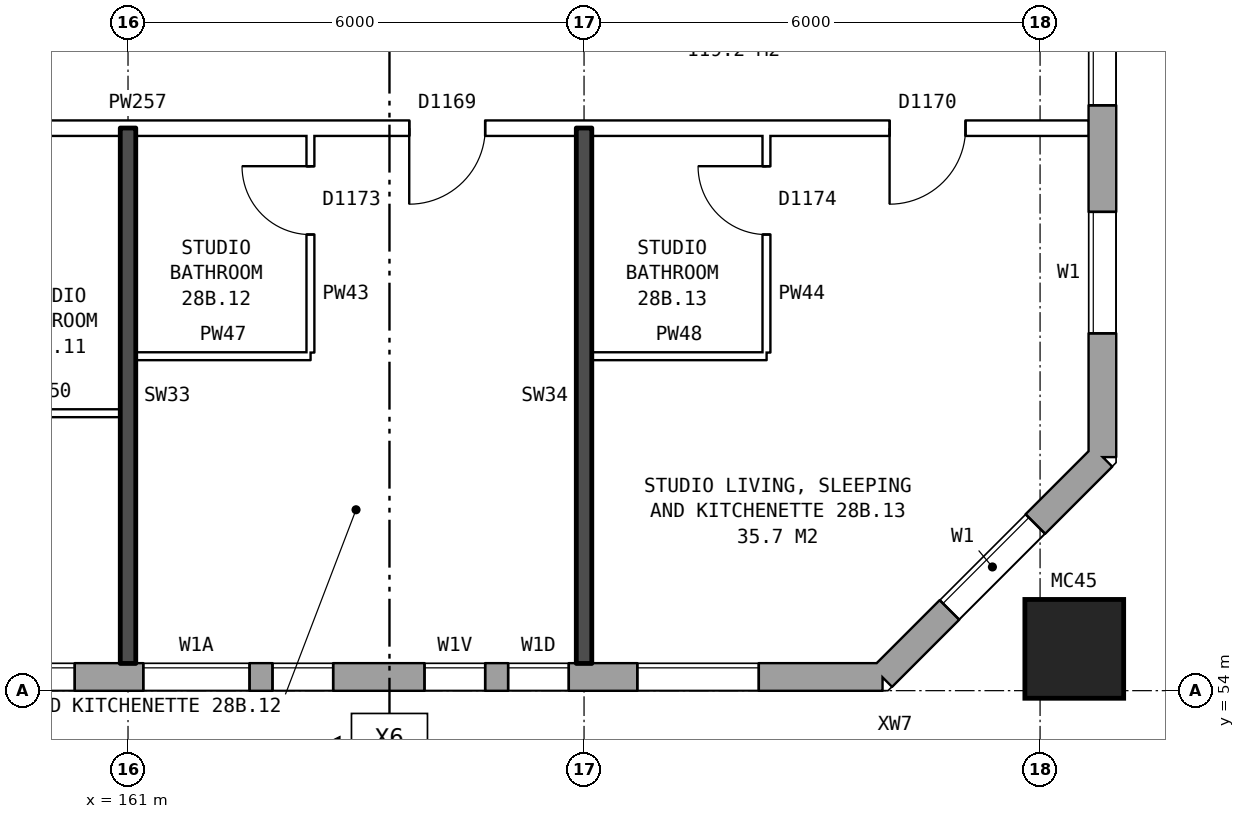
"""IFC4 building model, lengths in metres.
Left out: names, types, materials, properties, quantities, classifications, styles, units other than length and angle.
Written with IfcOpenShell. Run it as: python <this file> out.ifc"""

import sys

from ifc_helpers import new_model, si_unit, direction, frame, frame_2d, origin, origin_2d, place, context, subcontext, project, spatial, rectangle, hollow_rectangle, extrude, element, fill, save


model = new_model("IFC4")
c1 = context("Model", 3, precision=1e-05, world=origin(), true_north=direction((0.0, 1.0)))
c2 = subcontext(c1, "Body", "Model", "MODEL_VIEW")
j1 = project(units=[si_unit("LENGTHUNIT", "METRE"), si_unit("PLANEANGLEUNIT", "RADIAN")], contexts=[c1])
p1 = place(None, origin())
s1 = spatial("IfcSite", under=j1, at=p1, CompositionType="ELEMENT")
p2 = place(p1, origin())
s2 = spatial("IfcBuilding", under=s1, at=p2, CompositionType="ELEMENT")
p3 = place(p2, frame((0.0, 0.0, 102.6)))
s3 = spatial("IfcBuildingStorey", under=s2, at=p3, CompositionType="ELEMENT", Elevation=102.6)
p4 = place(p3, frame((173.45, 54.55, 0.0), z_axis=(0.0, 0.0, 1.0), x_axis=(1.0, 0.0, 0.0)))
e1 = element("IfcColumn", 1, at=p4, inside=s3, PredefinedType="COLUMN", context=c2, shape_type="SweptSolid", body=[
    extrude(hollow_rectangle(XDim=1.3, YDim=1.3, WallThickness=0.07, at=origin_2d()), origin(), (0.0, 0.0, 1.0), 3.1),
])
p5 = place(p3, frame((134.075, 54.18, 0.0), z_axis=(0.0, 0.0, 1.0), x_axis=(1.0, 0.0, 0.0)))
e2 = element("IfcWall", 2, at=p5, inside=s3, PredefinedType="STANDARD", context=c2, shape_type="SweptSolid", body=[
    extrude(rectangle(XDim=36.851, YDim=0.36, at=frame_2d((18.425, 0.0))), origin(), (0.0, 0.0, 1.0), 2.85),
])
p6 = place(p5, frame((0.625, 0.0, 0.8)))
e3 = element("IfcOpeningElement", 3, at=p6, cuts=e2, PredefinedType="OPENING", context=c2, shape_type="SweptSolid", body=[
    extrude(rectangle(XDim=1.6, YDim=1.8, at=frame_2d((0.8, 0.9))), frame((0.0, 0.19, 0.0), z_axis=(0.0, -1.0, 0.0), x_axis=(1.0, 0.0, 0.0)), (0.0, 0.0, 1.0), 0.38),
])
p7 = place(p5, frame((3.625, 0.0, 0.8)))
e4 = element("IfcOpeningElement", 4, at=p7, cuts=e2, PredefinedType="OPENING", context=c2, shape_type="SweptSolid", body=[
    extrude(rectangle(XDim=1.6, YDim=1.8, at=frame_2d((0.8, 0.9))), frame((0.0, 0.19, 0.0), z_axis=(0.0, -1.0, 0.0), x_axis=(1.0, 0.0, 0.0)), (0.0, 0.0, 1.0), 0.38),
])
p8 = place(p5, frame((7.475, 0.0, 0.8)))
e5 = element("IfcOpeningElement", 5, at=p8, cuts=e2, PredefinedType="OPENING", context=c2, shape_type="SweptSolid", body=[
    extrude(rectangle(XDim=1.2, YDim=1.2, at=frame_2d((0.6, 0.6))), frame((0.0, 0.19, 0.0), z_axis=(0.0, -1.0, 0.0), x_axis=(1.0, 0.0, 0.0)), (0.0, 0.0, 1.0), 0.38),
])
p9 = place(p5, frame((9.625, 0.0, 0.8)))
e6 = element("IfcOpeningElement", 6, at=p9, cuts=e2, PredefinedType="OPENING", context=c2, shape_type="SweptSolid", body=[
    extrude(rectangle(XDim=1.6, YDim=1.8, at=frame_2d((0.8, 0.9))), frame((0.0, 0.19, 0.0), z_axis=(0.0, -1.0, 0.0), x_axis=(1.0, 0.0, 0.0)), (0.0, 0.0, 1.0), 0.38),
])
p10 = place(p5, frame((12.625, 0.0, 0.8)))
e7 = element("IfcOpeningElement", 7, at=p10, cuts=e2, PredefinedType="OPENING", context=c2, shape_type="SweptSolid", body=[
    extrude(rectangle(XDim=1.6, YDim=1.8, at=frame_2d((0.8, 0.9))), frame((0.0, 0.19, 0.0), z_axis=(0.0, -1.0, 0.0), x_axis=(1.0, 0.0, 0.0)), (0.0, 0.0, 1.0), 0.38),
])
p11 = place(p5, frame((15.625, 0.0, 0.8)))
e8 = element("IfcOpeningElement", 8, at=p11, cuts=e2, PredefinedType="OPENING", context=c2, shape_type="SweptSolid", body=[
    extrude(rectangle(XDim=1.6, YDim=1.8, at=frame_2d((0.8, 0.9))), frame((0.0, 0.19, 0.0), z_axis=(0.0, -1.0, 0.0), x_axis=(1.0, 0.0, 0.0)), (0.0, 0.0, 1.0), 0.38),
])
p12 = place(p5, frame((18.625, 0.0, 0.8)))
e9 = element("IfcOpeningElement", 9, at=p12, cuts=e2, PredefinedType="OPENING", context=c2, shape_type="SweptSolid", body=[
    extrude(rectangle(XDim=1.6, YDim=1.8, at=frame_2d((0.8, 0.9))), frame((0.0, 0.19, 0.0), z_axis=(0.0, -1.0, 0.0), x_axis=(1.0, 0.0, 0.0)), (0.0, 0.0, 1.0), 0.38),
])
p13 = place(p5, frame((21.625, 0.0, 0.8)))
e10 = element("IfcOpeningElement", 10, at=p13, cuts=e2, PredefinedType="OPENING", context=c2, shape_type="SweptSolid", body=[
    extrude(rectangle(XDim=1.6, YDim=1.8, at=frame_2d((0.8, 0.9))), frame((0.0, 0.19, 0.0), z_axis=(0.0, -1.0, 0.0), x_axis=(1.0, 0.0, 0.0)), (0.0, 0.0, 1.0), 0.38),
])
p14 = place(p5, frame((24.625, 0.0, 0.8)))
e11 = element("IfcOpeningElement", 11, at=p14, cuts=e2, PredefinedType="OPENING", context=c2, shape_type="SweptSolid", body=[
    extrude(rectangle(XDim=1.6, YDim=1.8, at=frame_2d((0.8, 0.9))), frame((0.0, 0.19, 0.0), z_axis=(0.0, -1.0, 0.0), x_axis=(1.0, 0.0, 0.0)), (0.0, 0.0, 1.0), 0.38),
])
p15 = place(p5, frame((27.125, 0.0, 0.8)))
e12 = element("IfcOpeningElement", 12, at=p15, cuts=e2, PredefinedType="OPENING", context=c2, shape_type="SweptSolid", body=[
    extrude(rectangle(XDim=1.4, YDim=1.8, at=frame_2d((0.7, 0.9))), frame((0.0, 0.19, 0.0), z_axis=(0.0, -1.0, 0.0), x_axis=(1.0, 0.0, 0.0)), (0.0, 0.0, 1.0), 0.38),
])
p16 = place(p5, frame((28.825, 0.0, 0.8)))
e13 = element("IfcOpeningElement", 13, at=p16, cuts=e2, PredefinedType="OPENING", context=c2, shape_type="SweptSolid", body=[
    extrude(rectangle(XDim=0.8, YDim=0.9, at=frame_2d((0.4, 0.45))), frame((0.0, 0.19, 0.0), z_axis=(0.0, -1.0, 0.0), x_axis=(1.0, 0.0, 0.0)), (0.0, 0.0, 1.0), 0.38),
])
p17 = place(p5, frame((33.625, 0.0, 0.8)))
e14 = element("IfcOpeningElement", 14, at=p17, cuts=e2, PredefinedType="OPENING", context=c2, shape_type="SweptSolid", body=[
    extrude(rectangle(XDim=1.6, YDim=1.8, at=frame_2d((0.8, 0.9))), frame((0.0, 0.19, 0.0), z_axis=(0.0, -1.0, 0.0), x_axis=(1.0, 0.0, 0.0)), (0.0, 0.0, 1.0), 0.38),
])
p18 = place(p5, frame((30.825, 0.0, 1.7)))
e15 = element("IfcOpeningElement", 15, at=p18, cuts=e2, PredefinedType="OPENING", context=c2, shape_type="SweptSolid", body=[
    extrude(rectangle(XDim=0.8, YDim=0.9, at=frame_2d((0.4, 0.45))), frame((0.0, 0.19, 0.0), z_axis=(0.0, -1.0, 0.0), x_axis=(1.0, 0.0, 0.0)), (0.0, 0.0, 1.0), 0.38),
])
p19 = place(p5, frame((31.925, 0.0, 0.8)))
e16 = element("IfcOpeningElement", 16, at=p19, cuts=e2, PredefinedType="OPENING", context=c2, shape_type="SweptSolid", body=[
    extrude(rectangle(XDim=0.8, YDim=1.8, at=frame_2d((0.4, 0.9))), frame((0.0, 0.19, 0.0), z_axis=(0.0, -1.0, 0.0), x_axis=(1.0, 0.0, 0.0)), (0.0, 0.0, 1.0), 0.38),
])
p20 = place(p3, frame((170.925, 54.18, 0.0), z_axis=(0.0, 0.0, 1.0), x_axis=(0.707106781187, 0.707106781187, 0.0)))
e17 = element("IfcWall", 17, at=p20, inside=s3, PredefinedType="STANDARD", context=c2, shape_type="SweptSolid", body=[
    extrude(rectangle(XDim=4.094, YDim=0.36, at=frame_2d((2.047, 0.0))), origin(), (0.0, 0.0, 1.0), 2.85),
])
p21 = place(p20, frame((1.247, 0.0, 0.8)))
e18 = element("IfcOpeningElement", 18, at=p21, cuts=e17, PredefinedType="OPENING", context=c2, shape_type="SweptSolid", body=[
    extrude(rectangle(XDim=1.6, YDim=1.8, at=frame_2d((0.8, 0.9))), frame((0.0, 0.19, 0.0), z_axis=(0.0, -1.0, 0.0), x_axis=(1.0, 0.0, 0.0)), (0.0, 0.0, 1.0), 0.38),
])
p22 = place(p3, frame((173.82, 57.075, 0.0), z_axis=(0.0, 0.0, 1.0), x_axis=(0.0, 1.0, 0.0)))
e19 = element("IfcWall", 19, at=p22, inside=s3, PredefinedType="STANDARD", context=c2, shape_type="SweptSolid", body=[
    extrude(rectangle(XDim=25.851, YDim=0.36, at=frame_2d((12.925, 0.0))), origin(), (0.0, 0.0, 1.0), 2.85),
])
p23 = place(p22, frame((1.625, 0.0, 0.8)))
e20 = element("IfcOpeningElement", 20, at=p23, cuts=e19, PredefinedType="OPENING", context=c2, shape_type="SweptSolid", body=[
    extrude(rectangle(XDim=1.6, YDim=1.8, at=frame_2d((0.8, 0.9))), frame((0.0, 0.19, 0.0), z_axis=(0.0, -1.0, 0.0), x_axis=(1.0, 0.0, 0.0)), (0.0, 0.0, 1.0), 0.38),
])
p24 = place(p22, frame((4.625, 0.0, 0.8)))
e21 = element("IfcOpeningElement", 21, at=p24, cuts=e19, PredefinedType="OPENING", context=c2, shape_type="SweptSolid", body=[
    extrude(rectangle(XDim=1.6, YDim=1.8, at=frame_2d((0.8, 0.9))), frame((0.0, 0.19, 0.0), z_axis=(0.0, -1.0, 0.0), x_axis=(1.0, 0.0, 0.0)), (0.0, 0.0, 1.0), 0.38),
])
p25 = place(p22, frame((7.625, 0.0, 0.8)))
e22 = element("IfcOpeningElement", 22, at=p25, cuts=e19, PredefinedType="OPENING", context=c2, shape_type="SweptSolid", body=[
    extrude(rectangle(XDim=1.6, YDim=1.8, at=frame_2d((0.8, 0.9))), frame((0.0, 0.19, 0.0), z_axis=(0.0, -1.0, 0.0), x_axis=(1.0, 0.0, 0.0)), (0.0, 0.0, 1.0), 0.38),
])
p26 = place(p22, frame((6.525, 0.0, 0.8)))
e23 = element("IfcOpeningElement", 23, at=p26, cuts=e19, PredefinedType="OPENING", context=c2, shape_type="SweptSolid", body=[
    extrude(rectangle(XDim=0.8, YDim=1.8, at=frame_2d((0.4, 0.9))), frame((0.0, 0.19, 0.0), z_axis=(0.0, -1.0, 0.0), x_axis=(1.0, 0.0, 0.0)), (0.0, 0.0, 1.0), 0.38),
])
p27 = place(p22, frame((9.525, 0.0, 1.7)))
e24 = element("IfcOpeningElement", 24, at=p27, cuts=e19, PredefinedType="OPENING", context=c2, shape_type="SweptSolid", body=[
    extrude(rectangle(XDim=0.8, YDim=0.9, at=frame_2d((0.4, 0.45))), frame((0.0, 0.19, 0.0), z_axis=(0.0, -1.0, 0.0), x_axis=(1.0, 0.0, 0.0)), (0.0, 0.0, 1.0), 0.38),
])
p28 = place(p22, frame((16.625, 0.0, 0.8)))
e25 = element("IfcOpeningElement", 25, at=p28, cuts=e19, PredefinedType="OPENING", context=c2, shape_type="SweptSolid", body=[
    extrude(rectangle(XDim=1.6, YDim=1.8, at=frame_2d((0.8, 0.9))), frame((0.0, 0.19, 0.0), z_axis=(0.0, -1.0, 0.0), x_axis=(1.0, 0.0, 0.0)), (0.0, 0.0, 1.0), 0.38),
])
p29 = place(p22, frame((19.625, 0.0, 0.8)))
e26 = element("IfcOpeningElement", 26, at=p29, cuts=e19, PredefinedType="OPENING", context=c2, shape_type="SweptSolid", body=[
    extrude(rectangle(XDim=1.6, YDim=1.8, at=frame_2d((0.8, 0.9))), frame((0.0, 0.19, 0.0), z_axis=(0.0, -1.0, 0.0), x_axis=(1.0, 0.0, 0.0)), (0.0, 0.0, 1.0), 0.38),
])
p30 = place(p22, frame((22.625, 0.0, 0.8)))
e27 = element("IfcOpeningElement", 27, at=p30, cuts=e19, PredefinedType="OPENING", context=c2, shape_type="SweptSolid", body=[
    extrude(rectangle(XDim=1.6, YDim=1.8, at=frame_2d((0.8, 0.9))), frame((0.0, 0.19, 0.0), z_axis=(0.0, -1.0, 0.0), x_axis=(1.0, 0.0, 0.0)), (0.0, 0.0, 1.0), 0.38),
])
p31 = place(p22, frame((11.425, 0.0, 0.8)))
e28 = element("IfcOpeningElement", 28, at=p31, cuts=e19, PredefinedType="OPENING", context=c2, shape_type="SweptSolid", body=[
    extrude(rectangle(XDim=0.6, YDim=0.9, at=frame_2d((0.3, 0.45))), frame((0.0, 0.19, 0.0), z_axis=(0.0, -1.0, 0.0), x_axis=(1.0, 0.0, 0.0)), (0.0, 0.0, 1.0), 0.38),
])
p32 = place(p22, frame((12.325, 0.0, 0.8)))
e29 = element("IfcOpeningElement", 29, at=p32, cuts=e19, PredefinedType="OPENING", context=c2, shape_type="SweptSolid", body=[
    extrude(rectangle(XDim=1.2, YDim=1.8, at=frame_2d((0.6, 0.9))), frame((0.0, 0.19, 0.0), z_axis=(0.0, -1.0, 0.0), x_axis=(1.0, 0.0, 0.0)), (0.0, 0.0, 1.0), 0.38),
])
p33 = place(p22, frame((13.825, 0.0, 0.8)))
e30 = element("IfcOpeningElement", 30, at=p33, cuts=e19, PredefinedType="OPENING", context=c2, shape_type="SweptSolid", body=[
    extrude(rectangle(XDim=0.6, YDim=0.9, at=frame_2d((0.3, 0.45))), frame((0.0, 0.19, 0.0), z_axis=(0.0, -1.0, 0.0), x_axis=(1.0, 0.0, 0.0)), (0.0, 0.0, 1.0), 0.38),
])
p34 = place(p22, frame((15.525, 0.0, 1.7)))
e31 = element("IfcOpeningElement", 31, at=p34, cuts=e19, PredefinedType="OPENING", context=c2, shape_type="SweptSolid", body=[
    extrude(rectangle(XDim=0.6, YDim=0.9, at=frame_2d((0.3, 0.45))), frame((0.0, 0.19, 0.0), z_axis=(0.0, -1.0, 0.0), x_axis=(1.0, 0.0, 0.0)), (0.0, 0.0, 1.0), 0.38),
])
p35 = place(p22, frame((18.525, 0.0, 0.8)))
e32 = element("IfcOpeningElement", 32, at=p35, cuts=e19, PredefinedType="OPENING", context=c2, shape_type="SweptSolid", body=[
    extrude(rectangle(XDim=0.8, YDim=1.8, at=frame_2d((0.4, 0.9))), frame((0.0, 0.19, 0.0), z_axis=(0.0, -1.0, 0.0), x_axis=(1.0, 0.0, 0.0)), (0.0, 0.0, 1.0), 0.38),
])
p36 = place(p3, frame((159.0, 57.65, 0.0), z_axis=(0.0, 0.0, 1.0), x_axis=(1.0, 0.0, 0.0)))
e33 = element("IfcWall", 33, at=p36, inside=s3, PredefinedType="PARTITIONING", context=c2, shape_type="SweptSolid", body=[
    extrude(rectangle(XDim=1.9, YDim=0.1, at=frame_2d((0.95, 0.0))), origin(), (0.0, 0.0, 1.0), 2.85),
])
for number, where, z_axis, x_axis in (
    (34, (161.1, 58.4, 0.0), (0.0, 0.0, 1.0), (1.0, 0.0, 0.0)),
    (35, (167.1, 58.4, 0.0), (0.0, 0.0, 1.0), (1.0, 0.0, 0.0)),
):
    element("IfcWall", number, at=place(p3, frame(where, z_axis=z_axis, x_axis=x_axis)), inside=s3, PredefinedType="PARTITIONING", context=c2, shape_type="SweptSolid", body=[
        extrude(rectangle(XDim=2.3, YDim=0.1, at=frame_2d((1.15, 0.0))), origin(), (0.0, 0.0, 1.0), 2.85),
    ])
p37 = place(p3, frame((155.1, 61.4, 0.0), z_axis=(0.0, 0.0, 1.0), x_axis=(1.0, 0.0, 0.0)))
e36 = element("IfcWall", 36, at=p37, inside=s3, PredefinedType="PARTITIONING", context=c2, shape_type="SweptSolid", body=[
    extrude(rectangle(XDim=18.54, YDim=0.2, at=frame_2d((9.27, 0.0))), origin(), (0.0, 0.0, 1.0), 2.85),
])
p38 = place(p37, frame((1.45, 0.0, 0.0)))
e37 = element("IfcOpeningElement", 37, at=p38, cuts=e36, PredefinedType="OPENING", context=c2, shape_type="SweptSolid", body=[
    extrude(rectangle(XDim=1.0, YDim=2.1, at=frame_2d((0.5, 1.05))), frame((0.0, 0.11, 0.0), z_axis=(0.0, -1.0, 0.0), x_axis=(1.0, 0.0, 0.0)), (0.0, 0.0, 1.0), 0.22),
])
p39 = place(p37, frame((9.6, 0.0, 0.0)))
e38 = element("IfcOpeningElement", 38, at=p39, cuts=e36, PredefinedType="OPENING", context=c2, shape_type="SweptSolid", body=[
    extrude(rectangle(XDim=1.0, YDim=2.1, at=frame_2d((0.5, 1.05))), frame((0.0, 0.11, 0.0), z_axis=(0.0, -1.0, 0.0), x_axis=(1.0, 0.0, 0.0)), (0.0, 0.0, 1.0), 0.22),
])
p40 = place(p37, frame((15.92, 0.0, 0.0)))
e39 = element("IfcOpeningElement", 39, at=p40, cuts=e36, PredefinedType="OPENING", context=c2, shape_type="SweptSolid", body=[
    extrude(rectangle(XDim=1.0, YDim=2.1, at=frame_2d((0.5, 1.05))), frame((0.0, 0.11, 0.0), z_axis=(0.0, -1.0, 0.0), x_axis=(1.0, 0.0, 0.0)), (0.0, 0.0, 1.0), 0.22),
])
p41 = place(p3, frame((161.0, 54.36, 0.0), z_axis=(0.0, 0.0, 1.0), x_axis=(0.0, 1.0, 0.0)))
e40 = element("IfcWall", 40, at=p41, inside=s3, PredefinedType="SOLIDWALL", context=c2, shape_type="SweptSolid", body=[
    extrude(rectangle(XDim=7.04, YDim=0.2, at=frame_2d((3.52, 0.0))), origin(), (0.0, 0.0, 1.0), 2.85),
])
p42 = place(p3, frame((163.4, 58.45, 0.0), z_axis=(0.0, 0.0, 1.0), x_axis=(0.0, 1.0, 0.0)))
e41 = element("IfcWall", 41, at=p42, inside=s3, PredefinedType="PARTITIONING", context=c2, shape_type="SweptSolid", body=[
    extrude(rectangle(XDim=2.85, YDim=0.1, at=frame_2d((1.425, 0.0))), origin(), (0.0, 0.0, 1.0), 2.85),
])
p43 = place(p42, frame((1.55, 0.0, 0.0)))
e42 = element("IfcOpeningElement", 42, at=p43, cuts=e41, PredefinedType="OPENING", context=c2, shape_type="SweptSolid", body=[
    extrude(rectangle(XDim=0.9, YDim=2.1, at=frame_2d((0.45, 1.05))), frame((0.0, 0.06, 0.0), z_axis=(0.0, -1.0, 0.0), x_axis=(1.0, 0.0, 0.0)), (0.0, 0.0, 1.0), 0.12),
])
p44 = place(p3, frame((167.0, 54.36, 0.0), z_axis=(0.0, 0.0, 1.0), x_axis=(0.0, 1.0, 0.0)))
e43 = element("IfcWall", 43, at=p44, inside=s3, PredefinedType="SOLIDWALL", context=c2, shape_type="SweptSolid", body=[
    extrude(rectangle(XDim=7.04, YDim=0.2, at=frame_2d((3.52, 0.0))), origin(), (0.0, 0.0, 1.0), 2.85),
])
p45 = place(p3, frame((169.4, 58.45, 0.0), z_axis=(0.0, 0.0, 1.0), x_axis=(0.0, 1.0, 0.0)))
e44 = element("IfcWall", 44, at=p45, inside=s3, PredefinedType="PARTITIONING", context=c2, shape_type="SweptSolid", body=[
    extrude(rectangle(XDim=2.85, YDim=0.1, at=frame_2d((1.425, 0.0))), origin(), (0.0, 0.0, 1.0), 2.85),
])
p46 = place(p45, frame((1.55, 0.0, 0.0)))
e45 = element("IfcOpeningElement", 45, at=p46, cuts=e44, PredefinedType="OPENING", context=c2, shape_type="SweptSolid", body=[
    extrude(rectangle(XDim=0.9, YDim=2.1, at=frame_2d((0.45, 1.05))), frame((0.0, 0.06, 0.0), z_axis=(0.0, -1.0, 0.0), x_axis=(1.0, 0.0, 0.0)), (0.0, 0.0, 1.0), 0.12),
])
p47 = place(p14, origin())
e46 = element("IfcWindow", 46, at=p47, inside=s3, PartitioningType="SINGLE_PANEL", PredefinedType="WINDOW", context=c2, shape_type="SweptSolid", body=[
    extrude(rectangle(XDim=1.6, YDim=1.8, at=frame_2d((0.8, 0.9))), frame((0.0, 0.15, 0.0), z_axis=(0.0, -1.0, 0.0), x_axis=(1.0, 0.0, 0.0)), (0.0, 0.0, 1.0), 0.06),
])
fill(e11, e46)
p48 = place(p15, origin())
e47 = element("IfcWindow", 47, at=p48, inside=s3, PartitioningType="SINGLE_PANEL", PredefinedType="WINDOW", context=c2, shape_type="SweptSolid", body=[
    extrude(rectangle(XDim=1.4, YDim=1.8, at=frame_2d((0.7, 0.9))), frame((0.0, 0.15, 0.0), z_axis=(0.0, -1.0, 0.0), x_axis=(1.0, 0.0, 0.0)), (0.0, 0.0, 1.0), 0.06),
])
fill(e12, e47)
p49 = place(p16, origin())
e48 = element("IfcWindow", 48, at=p49, inside=s3, PartitioningType="SINGLE_PANEL", PredefinedType="WINDOW", context=c2, shape_type="SweptSolid", body=[
    extrude(rectangle(XDim=0.8, YDim=0.9, at=frame_2d((0.4, 0.45))), frame((0.0, 0.15, 0.0), z_axis=(0.0, -1.0, 0.0), x_axis=(1.0, 0.0, 0.0)), (0.0, 0.0, 1.0), 0.06),
])
fill(e13, e48)
p50 = place(p17, origin())
e49 = element("IfcWindow", 49, at=p50, inside=s3, PartitioningType="SINGLE_PANEL", PredefinedType="WINDOW", context=c2, shape_type="SweptSolid", body=[
    extrude(rectangle(XDim=1.6, YDim=1.8, at=frame_2d((0.8, 0.9))), frame((0.0, 0.15, 0.0), z_axis=(0.0, -1.0, 0.0), x_axis=(1.0, 0.0, 0.0)), (0.0, 0.0, 1.0), 0.06),
])
fill(e14, e49)
p51 = place(p21, origin())
e50 = element("IfcWindow", 50, at=p51, inside=s3, PartitioningType="SINGLE_PANEL", PredefinedType="WINDOW", context=c2, shape_type="SweptSolid", body=[
    extrude(rectangle(XDim=1.6, YDim=1.8, at=frame_2d((0.8, 0.9))), frame((0.0, 0.15, 0.0), z_axis=(0.0, -1.0, 0.0), x_axis=(1.0, 0.0, 0.0)), (0.0, 0.0, 1.0), 0.06),
])
fill(e18, e50)
p52 = place(p23, origin())
e51 = element("IfcWindow", 51, at=p52, inside=s3, PartitioningType="SINGLE_PANEL", PredefinedType="WINDOW", context=c2, shape_type="SweptSolid", body=[
    extrude(rectangle(XDim=1.6, YDim=1.8, at=frame_2d((0.8, 0.9))), frame((0.0, 0.15, 0.0), z_axis=(0.0, -1.0, 0.0), x_axis=(1.0, 0.0, 0.0)), (0.0, 0.0, 1.0), 0.06),
])
fill(e20, e51)
p53 = place(p24, origin())
e52 = element("IfcWindow", 52, at=p53, inside=s3, PartitioningType="SINGLE_PANEL", PredefinedType="WINDOW", context=c2, shape_type="SweptSolid", body=[
    extrude(rectangle(XDim=1.6, YDim=1.8, at=frame_2d((0.8, 0.9))), frame((0.0, 0.15, 0.0), z_axis=(0.0, -1.0, 0.0), x_axis=(1.0, 0.0, 0.0)), (0.0, 0.0, 1.0), 0.06),
])
fill(e21, e52)
p54 = place(p39, frame((1.0, 0.0, 0.0), z_axis=(0.0, 0.0, 1.0), x_axis=(-1.0, 0.0, 0.0)))
e53 = element("IfcDoor", 53, at=p54, inside=s3, OperationType="SINGLE_SWING_RIGHT", PredefinedType="DOOR", context=c2, shape_type="SweptSolid", body=[
    extrude(rectangle(XDim=1.0, YDim=2.1, at=frame_2d((0.5, 1.05))), frame((0.0, 0.025, 0.0), z_axis=(0.0, -1.0, 0.0), x_axis=(1.0, 0.0, 0.0)), (0.0, 0.0, 1.0), 0.05),
])
fill(e38, e53)
p55 = place(p43, origin())
e54 = element("IfcDoor", 54, at=p55, inside=s3, OperationType="SINGLE_SWING_RIGHT", PredefinedType="DOOR", context=c2, shape_type="SweptSolid", body=[
    extrude(rectangle(XDim=0.9, YDim=2.1, at=frame_2d((0.45, 1.05))), frame((0.0, 0.025, 0.0), z_axis=(0.0, -1.0, 0.0), x_axis=(1.0, 0.0, 0.0)), (0.0, 0.0, 1.0), 0.05),
])
fill(e42, e54)
p56 = place(p40, frame((1.0, 0.0, 0.0), z_axis=(0.0, 0.0, 1.0), x_axis=(-1.0, 0.0, 0.0)))
e55 = element("IfcDoor", 55, at=p56, inside=s3, OperationType="SINGLE_SWING_RIGHT", PredefinedType="DOOR", context=c2, shape_type="SweptSolid", body=[
    extrude(rectangle(XDim=1.0, YDim=2.1, at=frame_2d((0.5, 1.05))), frame((0.0, 0.025, 0.0), z_axis=(0.0, -1.0, 0.0), x_axis=(1.0, 0.0, 0.0)), (0.0, 0.0, 1.0), 0.05),
])
fill(e39, e55)
p57 = place(p46, origin())
e56 = element("IfcDoor", 56, at=p57, inside=s3, OperationType="SINGLE_SWING_RIGHT", PredefinedType="DOOR", context=c2, shape_type="SweptSolid", body=[
    extrude(rectangle(XDim=0.9, YDim=2.1, at=frame_2d((0.45, 1.05))), frame((0.0, 0.025, 0.0), z_axis=(0.0, -1.0, 0.0), x_axis=(1.0, 0.0, 0.0)), (0.0, 0.0, 1.0), 0.05),
])
fill(e45, e56)
p58 = place(p18, origin())
e57 = element("IfcWindow", 57, at=p58, inside=s3, PartitioningType="SINGLE_PANEL", PredefinedType="WINDOW", context=c2, shape_type="SweptSolid", body=[
    extrude(rectangle(XDim=0.8, YDim=0.9, at=frame_2d((0.4, 0.45))), frame((0.0, 0.15, 0.0), z_axis=(0.0, -1.0, 0.0), x_axis=(1.0, 0.0, 0.0)), (0.0, 0.0, 1.0), 0.06),
])
fill(e15, e57)
p59 = place(p19, origin())
e58 = element("IfcWindow", 58, at=p59, inside=s3, PartitioningType="SINGLE_PANEL", PredefinedType="WINDOW", context=c2, shape_type="SweptSolid", body=[
    extrude(rectangle(XDim=0.8, YDim=1.8, at=frame_2d((0.4, 0.9))), frame((0.0, 0.15, 0.0), z_axis=(0.0, -1.0, 0.0), x_axis=(1.0, 0.0, 0.0)), (0.0, 0.0, 1.0), 0.06),
])
fill(e16, e58)
save(model, sys.argv[1])
